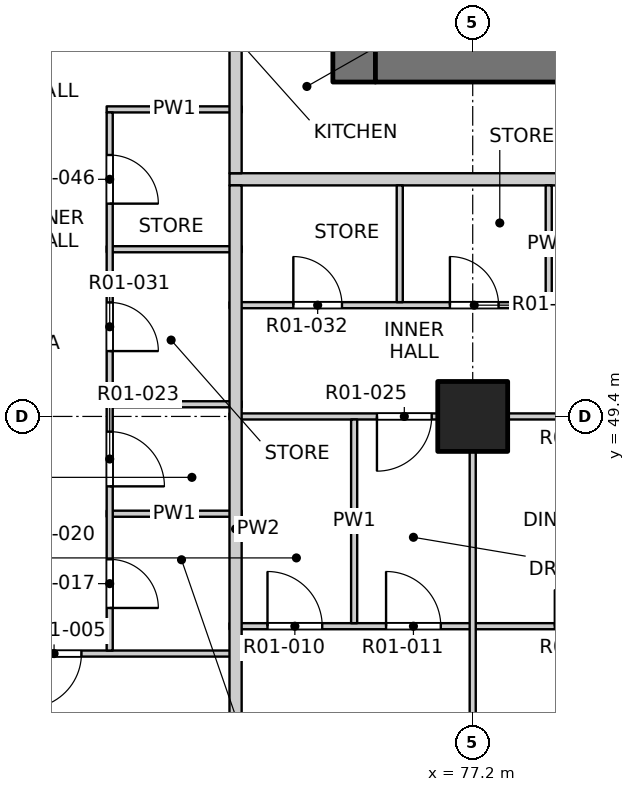
"""IFC4 building model, lengths in metres.
Left out: names, types, materials, properties, quantities, classifications, styles, units other than length and angle.
Written with IfcOpenShell. Run it as: python <this file> out.ifc"""

import sys

from ifc_helpers import new_model, si_unit, direction, frame, frame_2d, origin, origin_2d, place, context, subcontext, project, spatial, rectangle, extrude, element, fill, save


model = new_model("IFC4")
c1 = context("Model", 3, precision=1e-05, world=origin(), true_north=direction((0.0, 1.0)))
c2 = subcontext(c1, "Body", "Model", "MODEL_VIEW")
j1 = project(units=[si_unit("LENGTHUNIT", "METRE"), si_unit("PLANEANGLEUNIT", "RADIAN")], contexts=[c1])
p1 = place(None, origin())
s1 = spatial("IfcSite", under=j1, at=p1, CompositionType="ELEMENT")
p2 = place(p1, origin())
s2 = spatial("IfcBuilding", under=s1, at=p2, CompositionType="ELEMENT")
p3 = place(p2, frame((0.0, 0.0, 26.3)))
s3 = spatial("IfcBuildingStorey", under=s2, at=p3, CompositionType="ELEMENT", Elevation=26.3)
p4 = place(p3, frame((77.2, 49.4, -0.25), z_axis=(0.0, 0.0, 1.0), x_axis=(1.0, 0.0, 0.0)))
e1 = element("IfcColumn", 1, at=p4, inside=s3, PredefinedType="COLUMN", context=c2, shape_type="SweptSolid", body=[
    extrude(rectangle(XDim=1.15, YDim=1.15, at=origin_2d()), origin(), (0.0, 0.0, 1.0), 3.4),
])
p5 = place(p3, frame((75.25, 54.9, -0.25), z_axis=(0.0, 0.0, 1.0), x_axis=(0.0, 1.0, 0.0)))
e2 = element("IfcWall", 2, at=p5, inside=s3, PredefinedType="SOLIDWALL", context=c2, shape_type="SweptSolid", body=[
    extrude(rectangle(XDim=22.4, YDim=0.7, at=frame_2d((11.2, 0.0))), origin(), (0.0, 0.0, 1.0), 3.4),
])
p6 = place(p5, frame((7.55, 0.0, 0.25)))
e3 = element("IfcOpeningElement", 3, at=p6, cuts=e2, PredefinedType="OPENING", context=c2, shape_type="SweptSolid", body=[
    extrude(rectangle(XDim=0.9, YDim=2.1, at=frame_2d((0.45, 1.05))), frame((0.0, 0.36, 0.0), z_axis=(0.0, -1.0, 0.0), x_axis=(1.0, 0.0, 0.0)), (0.0, 0.0, 1.0), 0.72),
])
p7 = place(p5, frame((10.85, 0.0, 0.25)))
e4 = element("IfcOpeningElement", 4, at=p7, cuts=e2, PredefinedType="OPENING", context=c2, shape_type="SweptSolid", body=[
    extrude(rectangle(XDim=0.9, YDim=2.1, at=frame_2d((0.45, 1.05))), frame((0.0, 0.36, 0.0), z_axis=(0.0, -1.0, 0.0), x_axis=(1.0, 0.0, 0.0)), (0.0, 0.0, 1.0), 0.72),
])
p8 = place(p5, frame((15.35, 0.0, 0.25)))
e5 = element("IfcOpeningElement", 5, at=p8, cuts=e2, PredefinedType="OPENING", context=c2, shape_type="SweptSolid", body=[
    extrude(rectangle(XDim=0.9, YDim=2.1, at=frame_2d((0.45, 1.05))), frame((0.0, 0.36, 0.0), z_axis=(0.0, -1.0, 0.0), x_axis=(1.0, 0.0, 0.0)), (0.0, 0.0, 1.0), 0.72),
])
p9 = place(p5, frame((20.15, 0.0, 0.25)))
e6 = element("IfcOpeningElement", 6, at=p9, cuts=e2, PredefinedType="OPENING", context=c2, shape_type="SweptSolid", body=[
    extrude(rectangle(XDim=0.9, YDim=2.1, at=frame_2d((0.45, 1.05))), frame((0.0, 0.36, 0.0), z_axis=(0.0, -1.0, 0.0), x_axis=(1.0, 0.0, 0.0)), (0.0, 0.0, 1.0), 0.72),
])
p10 = place(p3, frame((75.6, 55.25, -0.25), z_axis=(0.0, 0.0, 1.0), x_axis=(1.0, 0.0, 0.0)))
e7 = element("IfcWall", 7, at=p10, inside=s3, PredefinedType="SOLIDWALL", context=c2, shape_type="SweptSolid", body=[
    extrude(rectangle(XDim=18.8, YDim=0.7, at=frame_2d((9.4, 0.0))), origin(), (0.0, 0.0, 1.0), 3.4),
])
p11 = place(p10, frame((8.65, 0.0, 0.25)))
e8 = element("IfcOpeningElement", 8, at=p11, cuts=e7, PredefinedType="OPENING", context=c2, shape_type="SweptSolid", body=[
    extrude(rectangle(XDim=1.5, YDim=2.1, at=frame_2d((0.75, 1.05))), frame((0.0, 0.36, 0.0), z_axis=(0.0, -1.0, 0.0), x_axis=(1.0, 0.0, 0.0)), (0.0, 0.0, 1.0), 0.72),
])
p12 = place(p3, frame((61.9, 45.5, 0.0), z_axis=(0.0, 0.0, 1.0), x_axis=(1.0, 0.0, 0.0)))
e9 = element("IfcWall", 9, at=p12, inside=s3, PredefinedType="PARTITIONING", context=c2, shape_type="SweptSolid", body=[
    extrude(rectangle(XDim=11.5, YDim=0.1, at=frame_2d((5.75, 0.0))), origin(), (0.0, 0.0, 1.0), 3.15),
])
p13 = place(p12, frame((7.965, 0.0, 0.0)))
e10 = element("IfcOpeningElement", 10, at=p13, cuts=e9, PredefinedType="OPENING", context=c2, shape_type="SweptSolid", body=[
    extrude(rectangle(XDim=0.9, YDim=2.1, at=frame_2d((0.45, 1.05))), frame((0.0, 0.06, 0.0), z_axis=(0.0, -1.0, 0.0), x_axis=(1.0, 0.0, 0.0)), (0.0, 0.0, 1.0), 0.12),
])
p14 = place(p3, frame((73.2, 45.95, 0.0), z_axis=(0.0, 0.0, 1.0), x_axis=(1.0, 0.0, 0.0)))
e11 = element("IfcWall", 11, at=p14, inside=s3, PredefinedType="PARTITIONING", context=c2, shape_type="SweptSolid", body=[
    extrude(rectangle(XDim=15.8, YDim=0.1, at=frame_2d((7.9, 0.0))), origin(), (0.0, 0.0, 1.0), 3.15),
])
p15 = place(p14, frame((0.625, 0.0, 0.0)))
e12 = element("IfcOpeningElement", 12, at=p15, cuts=e11, PredefinedType="OPENING", context=c2, shape_type="SweptSolid", body=[
    extrude(rectangle(XDim=0.9, YDim=2.1, at=frame_2d((0.45, 1.05))), frame((0.0, 0.06, 0.0), z_axis=(0.0, -1.0, 0.0), x_axis=(1.0, 0.0, 0.0)), (0.0, 0.0, 1.0), 0.12),
])
p16 = place(p14, frame((2.575, 0.0, 0.0)))
e13 = element("IfcOpeningElement", 13, at=p16, cuts=e11, PredefinedType="OPENING", context=c2, shape_type="SweptSolid", body=[
    extrude(rectangle(XDim=0.9, YDim=2.1, at=frame_2d((0.45, 1.05))), frame((0.0, 0.06, 0.0), z_axis=(0.0, -1.0, 0.0), x_axis=(1.0, 0.0, 0.0)), (0.0, 0.0, 1.0), 0.12),
])
p17 = place(p14, frame((5.35, 0.0, 0.0)))
e14 = element("IfcOpeningElement", 14, at=p17, cuts=e11, PredefinedType="OPENING", context=c2, shape_type="SweptSolid", body=[
    extrude(rectangle(XDim=1.2, YDim=2.1, at=frame_2d((0.6, 1.05))), frame((0.0, 0.06, 0.0), z_axis=(0.0, -1.0, 0.0), x_axis=(1.0, 0.0, 0.0)), (0.0, 0.0, 1.0), 0.12),
])
p18 = place(p14, frame((9.25, 0.0, 0.0)))
e15 = element("IfcOpeningElement", 15, at=p18, cuts=e11, PredefinedType="OPENING", context=c2, shape_type="SweptSolid", body=[
    extrude(rectangle(XDim=1.2, YDim=2.1, at=frame_2d((0.6, 1.05))), frame((0.0, 0.06, 0.0), z_axis=(0.0, -1.0, 0.0), x_axis=(1.0, 0.0, 0.0)), (0.0, 0.0, 1.0), 0.12),
])
p19 = place(p14, frame((12.325, 0.0, 0.0)))
e16 = element("IfcOpeningElement", 16, at=p19, cuts=e11, PredefinedType="OPENING", context=c2, shape_type="SweptSolid", body=[
    extrude(rectangle(XDim=0.9, YDim=2.1, at=frame_2d((0.45, 1.05))), frame((0.0, 0.06, 0.0), z_axis=(0.0, -1.0, 0.0), x_axis=(1.0, 0.0, 0.0)), (0.0, 0.0, 1.0), 0.12),
])
p20 = place(p14, frame((14.275, 0.0, 0.0)))
e17 = element("IfcOpeningElement", 17, at=p20, cuts=e11, PredefinedType="OPENING", context=c2, shape_type="SweptSolid", body=[
    extrude(rectangle(XDim=0.9, YDim=2.1, at=frame_2d((0.45, 1.05))), frame((0.0, 0.06, 0.0), z_axis=(0.0, -1.0, 0.0), x_axis=(1.0, 0.0, 0.0)), (0.0, 0.0, 1.0), 0.12),
])
p21 = place(p3, frame((71.18, 47.8, 0.0), z_axis=(0.0, 0.0, 1.0), x_axis=(1.0, 0.0, 0.0)))
e18 = element("IfcWall", 18, at=p21, inside=s3, PredefinedType="PARTITIONING", context=c2, shape_type="SweptSolid", body=[
    extrude(rectangle(XDim=2.22, YDim=0.1, at=frame_2d((1.11, 0.0))), origin(), (0.0, 0.0, 1.0), 3.15),
])
p22 = place(p3, frame((73.2, 49.4, 0.0), z_axis=(0.0, 0.0, 1.0), x_axis=(1.0, 0.0, 0.0)))
e19 = element("IfcWall", 19, at=p22, inside=s3, PredefinedType="PARTITIONING", context=c2, shape_type="SweptSolid", body=[
    extrude(rectangle(XDim=23.6, YDim=0.1, at=frame_2d((11.8, 0.0))), origin(), (0.0, 0.0, 1.0), 3.15),
])
p23 = place(p22, frame((2.425, 0.0, 0.0)))
e20 = element("IfcOpeningElement", 20, at=p23, cuts=e19, PredefinedType="OPENING", context=c2, shape_type="SweptSolid", body=[
    extrude(rectangle(XDim=0.9, YDim=2.1, at=frame_2d((0.45, 1.05))), frame((0.0, 0.06, 0.0), z_axis=(0.0, -1.0, 0.0), x_axis=(1.0, 0.0, 0.0)), (0.0, 0.0, 1.0), 0.12),
])
p24 = place(p22, frame((5.5, 0.0, 0.0)))
e21 = element("IfcOpeningElement", 21, at=p24, cuts=e19, PredefinedType="OPENING", context=c2, shape_type="SweptSolid", body=[
    extrude(rectangle(XDim=0.9, YDim=2.1, at=frame_2d((0.45, 1.05))), frame((0.0, 0.06, 0.0), z_axis=(0.0, -1.0, 0.0), x_axis=(1.0, 0.0, 0.0)), (0.0, 0.0, 1.0), 0.12),
])
p25 = place(p22, frame((9.4, 0.0, 0.0)))
e22 = element("IfcOpeningElement", 22, at=p25, cuts=e19, PredefinedType="OPENING", context=c2, shape_type="SweptSolid", body=[
    extrude(rectangle(XDim=0.9, YDim=2.1, at=frame_2d((0.45, 1.05))), frame((0.0, 0.06, 0.0), z_axis=(0.0, -1.0, 0.0), x_axis=(1.0, 0.0, 0.0)), (0.0, 0.0, 1.0), 0.12),
])
p26 = place(p22, frame((14.275, 0.0, 0.0)))
e23 = element("IfcOpeningElement", 23, at=p26, cuts=e19, PredefinedType="OPENING", context=c2, shape_type="SweptSolid", body=[
    extrude(rectangle(XDim=0.9, YDim=2.1, at=frame_2d((0.45, 1.05))), frame((0.0, 0.06, 0.0), z_axis=(0.0, -1.0, 0.0), x_axis=(1.0, 0.0, 0.0)), (0.0, 0.0, 1.0), 0.12),
])
p27 = place(p22, frame((17.2, 0.0, 0.0)))
e24 = element("IfcOpeningElement", 24, at=p27, cuts=e19, PredefinedType="OPENING", context=c2, shape_type="SweptSolid", body=[
    extrude(rectangle(XDim=0.9, YDim=2.1, at=frame_2d((0.45, 1.05))), frame((0.0, 0.06, 0.0), z_axis=(0.0, -1.0, 0.0), x_axis=(1.0, 0.0, 0.0)), (0.0, 0.0, 1.0), 0.12),
])
p28 = place(p22, frame((22.075, 0.0, 0.0)))
e25 = element("IfcOpeningElement", 25, at=p28, cuts=e19, PredefinedType="OPENING", context=c2, shape_type="SweptSolid", body=[
    extrude(rectangle(XDim=0.9, YDim=2.1, at=frame_2d((0.45, 1.05))), frame((0.0, 0.06, 0.0), z_axis=(0.0, -1.0, 0.0), x_axis=(1.0, 0.0, 0.0)), (0.0, 0.0, 1.0), 0.12),
])
p29 = place(p3, frame((71.18, 49.6, 0.0), z_axis=(0.0, 0.0, 1.0), x_axis=(1.0, 0.0, 0.0)))
e26 = element("IfcWall", 26, at=p29, inside=s3, PredefinedType="PARTITIONING", context=c2, shape_type="SweptSolid", body=[
    extrude(rectangle(XDim=2.22, YDim=0.1, at=frame_2d((1.11, 0.0))), origin(), (0.0, 0.0, 1.0), 3.15),
])
p30 = place(p3, frame((73.2, 51.23, 0.0), z_axis=(0.0, 0.0, 1.0), x_axis=(1.0, 0.0, 0.0)))
e27 = element("IfcWall", 27, at=p30, inside=s3, PredefinedType="PARTITIONING", context=c2, shape_type="SweptSolid", body=[
    extrude(rectangle(XDim=5.3, YDim=0.1, at=frame_2d((2.65, 0.0))), origin(), (0.0, 0.0, 1.0), 3.15),
])
p31 = place(p30, frame((1.05, 0.0, 0.0)))
e28 = element("IfcOpeningElement", 28, at=p31, cuts=e27, PredefinedType="OPENING", context=c2, shape_type="SweptSolid", body=[
    extrude(rectangle(XDim=0.8, YDim=2.1, at=frame_2d((0.4, 1.05))), frame((0.0, 0.06, 0.0), z_axis=(0.0, -1.0, 0.0), x_axis=(1.0, 0.0, 0.0)), (0.0, 0.0, 1.0), 0.12),
])
p32 = place(p30, frame((3.625, 0.0, 0.0)))
e29 = element("IfcOpeningElement", 29, at=p32, cuts=e27, PredefinedType="OPENING", context=c2, shape_type="SweptSolid", body=[
    extrude(rectangle(XDim=0.8, YDim=2.1, at=frame_2d((0.4, 1.05))), frame((0.0, 0.06, 0.0), z_axis=(0.0, -1.0, 0.0), x_axis=(1.0, 0.0, 0.0)), (0.0, 0.0, 1.0), 0.12),
])
p33 = place(p3, frame((71.18, 52.15, 0.0), z_axis=(0.0, 0.0, 1.0), x_axis=(1.0, 0.0, 0.0)))
e30 = element("IfcWall", 30, at=p33, inside=s3, PredefinedType="PARTITIONING", context=c2, shape_type="SweptSolid", body=[
    extrude(rectangle(XDim=2.22, YDim=0.1, at=frame_2d((1.11, 0.0))), origin(), (0.0, 0.0, 1.0), 3.15),
])
p34 = place(p3, frame((73.2, 53.3, 0.0), z_axis=(0.0, 0.0, 1.0), x_axis=(1.0, 0.0, 0.0)))
e31 = element("IfcWall", 31, at=p34, inside=s3, PredefinedType="PARTITIONING", context=c2, shape_type="SweptSolid", body=[
    extrude(rectangle(XDim=23.6, YDim=0.2, at=frame_2d((11.8, 0.0))), origin(), (0.0, 0.0, 1.0), 3.15),
])
p35 = place(p34, frame((6.525, 0.0, 0.0)))
e32 = element("IfcOpeningElement", 32, at=p35, cuts=e31, PredefinedType="OPENING", context=c2, shape_type="SweptSolid", body=[
    extrude(rectangle(XDim=1.0, YDim=2.1, at=frame_2d((0.5, 1.05))), frame((0.0, 0.11, 0.0), z_axis=(0.0, -1.0, 0.0), x_axis=(1.0, 0.0, 0.0)), (0.0, 0.0, 1.0), 0.22),
])
p36 = place(p34, frame((18.275, 0.0, 0.0)))
e33 = element("IfcOpeningElement", 33, at=p36, cuts=e31, PredefinedType="OPENING", context=c2, shape_type="SweptSolid", body=[
    extrude(rectangle(XDim=1.0, YDim=2.1, at=frame_2d((0.5, 1.05))), frame((0.0, 0.11, 0.0), z_axis=(0.0, -1.0, 0.0), x_axis=(1.0, 0.0, 0.0)), (0.0, 0.0, 1.0), 0.22),
])
p37 = place(p3, frame((71.18, 54.45, 0.0), z_axis=(0.0, 0.0, 1.0), x_axis=(1.0, 0.0, 0.0)))
e34 = element("IfcWall", 34, at=p37, inside=s3, PredefinedType="PARTITIONING", context=c2, shape_type="SweptSolid", body=[
    extrude(rectangle(XDim=2.22, YDim=0.1, at=frame_2d((1.11, 0.0))), origin(), (0.0, 0.0, 1.0), 3.15),
])
p38 = place(p3, frame((71.23, 45.55, 0.0), z_axis=(0.0, 0.0, 1.0), x_axis=(0.0, 1.0, 0.0)))
e35 = element("IfcWall", 35, at=p38, inside=s3, PredefinedType="PARTITIONING", context=c2, shape_type="SweptSolid", body=[
    extrude(rectangle(XDim=8.85, YDim=0.1, at=frame_2d((4.425, 0.0))), origin(), (0.0, 0.0, 1.0), 3.15),
])
p39 = place(p38, frame((0.7, 0.0, 0.0)))
e36 = element("IfcOpeningElement", 36, at=p39, cuts=e35, PredefinedType="OPENING", context=c2, shape_type="SweptSolid", body=[
    extrude(rectangle(XDim=0.8, YDim=2.1, at=frame_2d((0.4, 1.05))), frame((0.0, 0.06, 0.0), z_axis=(0.0, -1.0, 0.0), x_axis=(1.0, 0.0, 0.0)), (0.0, 0.0, 1.0), 0.12),
])
p40 = place(p38, frame((2.7, 0.0, 0.0)))
e37 = element("IfcOpeningElement", 37, at=p40, cuts=e35, PredefinedType="OPENING", context=c2, shape_type="SweptSolid", body=[
    extrude(rectangle(XDim=0.9, YDim=2.1, at=frame_2d((0.45, 1.05))), frame((0.0, 0.06, 0.0), z_axis=(0.0, -1.0, 0.0), x_axis=(1.0, 0.0, 0.0)), (0.0, 0.0, 1.0), 0.12),
])
p41 = place(p38, frame((4.925, 0.0, 0.0)))
e38 = element("IfcOpeningElement", 38, at=p41, cuts=e35, PredefinedType="OPENING", context=c2, shape_type="SweptSolid", body=[
    extrude(rectangle(XDim=0.8, YDim=2.1, at=frame_2d((0.4, 1.05))), frame((0.0, 0.06, 0.0), z_axis=(0.0, -1.0, 0.0), x_axis=(1.0, 0.0, 0.0)), (0.0, 0.0, 1.0), 0.12),
])
p42 = place(p38, frame((7.35, 0.0, 0.0)))
e39 = element("IfcOpeningElement", 39, at=p42, cuts=e35, PredefinedType="OPENING", context=c2, shape_type="SweptSolid", body=[
    extrude(rectangle(XDim=0.8, YDim=2.1, at=frame_2d((0.4, 1.05))), frame((0.0, 0.06, 0.0), z_axis=(0.0, -1.0, 0.0), x_axis=(1.0, 0.0, 0.0)), (0.0, 0.0, 1.0), 0.12),
])
p43 = place(p3, frame((73.3, 41.9, 0.0), z_axis=(0.0, 0.0, 1.0), x_axis=(0.0, 1.0, 0.0)))
e40 = element("IfcWall", 40, at=p43, inside=s3, PredefinedType="PARTITIONING", context=c2, shape_type="SweptSolid", body=[
    extrude(rectangle(XDim=11.3, YDim=0.2, at=frame_2d((5.65, 0.0))), origin(), (0.0, 0.0, 1.0), 3.15),
])
p44 = place(p3, frame((73.3, 53.4, 0.0), z_axis=(0.0, 0.0, 1.0), x_axis=(0.0, 1.0, 0.0)))
e41 = element("IfcWall", 41, at=p44, inside=s3, PredefinedType="PARTITIONING", context=c2, shape_type="SweptSolid", body=[
    extrude(rectangle(XDim=31.0, YDim=0.2, at=frame_2d((15.5, 0.0))), origin(), (0.0, 0.0, 1.0), 3.15),
])
p45 = place(p44, frame((2.325, 0.0, 0.0)))
e42 = element("IfcOpeningElement", 42, at=p45, cuts=e41, PredefinedType="OPENING", context=c2, shape_type="SweptSolid", body=[
    extrude(rectangle(XDim=1.0, YDim=2.1, at=frame_2d((0.5, 1.05))), frame((0.0, 0.11, 0.0), z_axis=(0.0, -1.0, 0.0), x_axis=(1.0, 0.0, 0.0)), (0.0, 0.0, 1.0), 0.22),
])
p46 = place(p44, frame((10.725, 0.0, 0.0)))
e43 = element("IfcOpeningElement", 43, at=p46, cuts=e41, PredefinedType="OPENING", context=c2, shape_type="SweptSolid", body=[
    extrude(rectangle(XDim=1.0, YDim=2.1, at=frame_2d((0.5, 1.05))), frame((0.0, 0.11, 0.0), z_axis=(0.0, -1.0, 0.0), x_axis=(1.0, 0.0, 0.0)), (0.0, 0.0, 1.0), 0.22),
])
p47 = place(p44, frame((18.225, 0.0, 0.0)))
e44 = element("IfcOpeningElement", 44, at=p47, cuts=e41, PredefinedType="OPENING", context=c2, shape_type="SweptSolid", body=[
    extrude(rectangle(XDim=1.0, YDim=2.1, at=frame_2d((0.5, 1.05))), frame((0.0, 0.11, 0.0), z_axis=(0.0, -1.0, 0.0), x_axis=(1.0, 0.0, 0.0)), (0.0, 0.0, 1.0), 0.22),
])
p48 = place(p44, frame((25.925, 0.0, 0.0)))
e45 = element("IfcOpeningElement", 45, at=p48, cuts=e41, PredefinedType="OPENING", context=c2, shape_type="SweptSolid", body=[
    extrude(rectangle(XDim=1.0, YDim=2.1, at=frame_2d((0.5, 1.05))), frame((0.0, 0.11, 0.0), z_axis=(0.0, -1.0, 0.0), x_axis=(1.0, 0.0, 0.0)), (0.0, 0.0, 1.0), 0.22),
])
p49 = place(p3, frame((75.25, 46.0, 0.0), z_axis=(0.0, 0.0, 1.0), x_axis=(0.0, 1.0, 0.0)))
e46 = element("IfcWall", 46, at=p49, inside=s3, PredefinedType="PARTITIONING", context=c2, shape_type="SweptSolid", body=[
    extrude(rectangle(XDim=3.35, YDim=0.1, at=frame_2d((1.675, 0.0))), origin(), (0.0, 0.0, 1.0), 3.15),
])
p50 = place(p3, frame((76.0, 51.28, 0.0), z_axis=(0.0, 0.0, 1.0), x_axis=(0.0, 1.0, 0.0)))
e47 = element("IfcWall", 47, at=p50, inside=s3, PredefinedType="PARTITIONING", context=c2, shape_type="SweptSolid", body=[
    extrude(rectangle(XDim=1.92, YDim=0.1, at=frame_2d((0.96, 0.0))), origin(), (0.0, 0.0, 1.0), 3.15),
])
p51 = place(p3, frame((77.2, 41.9, 0.0), z_axis=(0.0, 0.0, 1.0), x_axis=(0.0, 1.0, 0.0)))
e48 = element("IfcWall", 48, at=p51, inside=s3, PredefinedType="PARTITIONING", context=c2, shape_type="SweptSolid", body=[
    extrude(rectangle(XDim=7.45, YDim=0.1, at=frame_2d((3.725, 0.0))), origin(), (0.0, 0.0, 1.0), 2.55),
])
p52 = place(p3, frame((78.45, 51.28, 0.0), z_axis=(0.0, 0.0, 1.0), x_axis=(0.0, 1.0, 0.0)))
e49 = element("IfcWall", 49, at=p52, inside=s3, PredefinedType="PARTITIONING", context=c2, shape_type="SweptSolid", body=[
    extrude(rectangle(XDim=1.92, YDim=0.1, at=frame_2d((0.96, 0.0))), origin(), (0.0, 0.0, 1.0), 3.15),
])
p53 = place(p13, origin())
e50 = element("IfcDoor", 50, at=p53, inside=s3, OperationType="SINGLE_SWING_RIGHT", PredefinedType="DOOR", context=c2, shape_type="SweptSolid", body=[
    extrude(rectangle(XDim=0.9, YDim=2.1, at=frame_2d((0.45, 1.05))), frame((0.0, 0.025, 0.0), z_axis=(0.0, -1.0, 0.0), x_axis=(1.0, 0.0, 0.0)), (0.0, 0.0, 1.0), 0.05),
])
fill(e10, e50)
p54 = place(p15, origin())
e51 = element("IfcDoor", 51, at=p54, inside=s3, OperationType="SINGLE_SWING_LEFT", PredefinedType="DOOR", context=c2, shape_type="SweptSolid", body=[
    extrude(rectangle(XDim=0.9, YDim=2.1, at=frame_2d((0.45, 1.05))), frame((0.0, 0.025, 0.0), z_axis=(0.0, -1.0, 0.0), x_axis=(1.0, 0.0, 0.0)), (0.0, 0.0, 1.0), 0.05),
])
fill(e12, e51)
p55 = place(p16, origin())
e52 = element("IfcDoor", 52, at=p55, inside=s3, OperationType="SINGLE_SWING_LEFT", PredefinedType="DOOR", context=c2, shape_type="SweptSolid", body=[
    extrude(rectangle(XDim=0.9, YDim=2.1, at=frame_2d((0.45, 1.05))), frame((0.0, 0.025, 0.0), z_axis=(0.0, -1.0, 0.0), x_axis=(1.0, 0.0, 0.0)), (0.0, 0.0, 1.0), 0.05),
])
fill(e13, e52)
p56 = place(p39, origin())
e53 = element("IfcDoor", 53, at=p56, inside=s3, OperationType="SINGLE_SWING_RIGHT", PredefinedType="DOOR", context=c2, shape_type="SweptSolid", body=[
    extrude(rectangle(XDim=0.8, YDim=2.1, at=frame_2d((0.4, 1.05))), frame((0.0, 0.025, 0.0), z_axis=(0.0, -1.0, 0.0), x_axis=(1.0, 0.0, 0.0)), (0.0, 0.0, 1.0), 0.05),
])
fill(e36, e53)
p57 = place(p40, origin())
e54 = element("IfcDoor", 54, at=p57, inside=s3, OperationType="SINGLE_SWING_RIGHT", PredefinedType="DOOR", context=c2, shape_type="SweptSolid", body=[
    extrude(rectangle(XDim=0.9, YDim=2.1, at=frame_2d((0.45, 1.05))), frame((0.0, 0.025, 0.0), z_axis=(0.0, -1.0, 0.0), x_axis=(1.0, 0.0, 0.0)), (0.0, 0.0, 1.0), 0.05),
])
fill(e37, e54)
p58 = place(p23, origin())
e55 = element("IfcDoor", 55, at=p58, inside=s3, OperationType="SINGLE_SWING_RIGHT", PredefinedType="DOOR", context=c2, shape_type="SweptSolid", body=[
    extrude(rectangle(XDim=0.9, YDim=2.1, at=frame_2d((0.45, 1.05))), frame((0.0, 0.025, 0.0), z_axis=(0.0, -1.0, 0.0), x_axis=(1.0, 0.0, 0.0)), (0.0, 0.0, 1.0), 0.05),
])
fill(e20, e55)
p59 = place(p41, origin())
e56 = element("IfcDoor", 56, at=p59, inside=s3, OperationType="SINGLE_SWING_RIGHT", PredefinedType="DOOR", context=c2, shape_type="SweptSolid", body=[
    extrude(rectangle(XDim=0.8, YDim=2.1, at=frame_2d((0.4, 1.05))), frame((0.0, 0.025, 0.0), z_axis=(0.0, -1.0, 0.0), x_axis=(1.0, 0.0, 0.0)), (0.0, 0.0, 1.0), 0.05),
])
fill(e38, e56)
p60 = place(p31, origin())
e57 = element("IfcDoor", 57, at=p60, inside=s3, OperationType="SINGLE_SWING_LEFT", PredefinedType="DOOR", context=c2, shape_type="SweptSolid", body=[
    extrude(rectangle(XDim=0.8, YDim=2.1, at=frame_2d((0.4, 1.05))), frame((0.0, 0.025, 0.0), z_axis=(0.0, -1.0, 0.0), x_axis=(1.0, 0.0, 0.0)), (0.0, 0.0, 1.0), 0.05),
])
fill(e28, e57)
p61 = place(p32, origin())
e58 = element("IfcDoor", 58, at=p61, inside=s3, OperationType="SINGLE_SWING_LEFT", PredefinedType="DOOR", context=c2, shape_type="SweptSolid", body=[
    extrude(rectangle(XDim=0.8, YDim=2.1, at=frame_2d((0.4, 1.05))), frame((0.0, 0.025, 0.0), z_axis=(0.0, -1.0, 0.0), x_axis=(1.0, 0.0, 0.0)), (0.0, 0.0, 1.0), 0.05),
])
fill(e29, e58)
p62 = place(p42, origin())
e59 = element("IfcDoor", 59, at=p62, inside=s3, OperationType="SINGLE_SWING_RIGHT", PredefinedType="DOOR", context=c2, shape_type="SweptSolid", body=[
    extrude(rectangle(XDim=0.8, YDim=2.1, at=frame_2d((0.4, 1.05))), frame((0.0, 0.025, 0.0), z_axis=(0.0, -1.0, 0.0), x_axis=(1.0, 0.0, 0.0)), (0.0, 0.0, 1.0), 0.05),
])
fill(e39, e59)
save(model, sys.argv[1])
